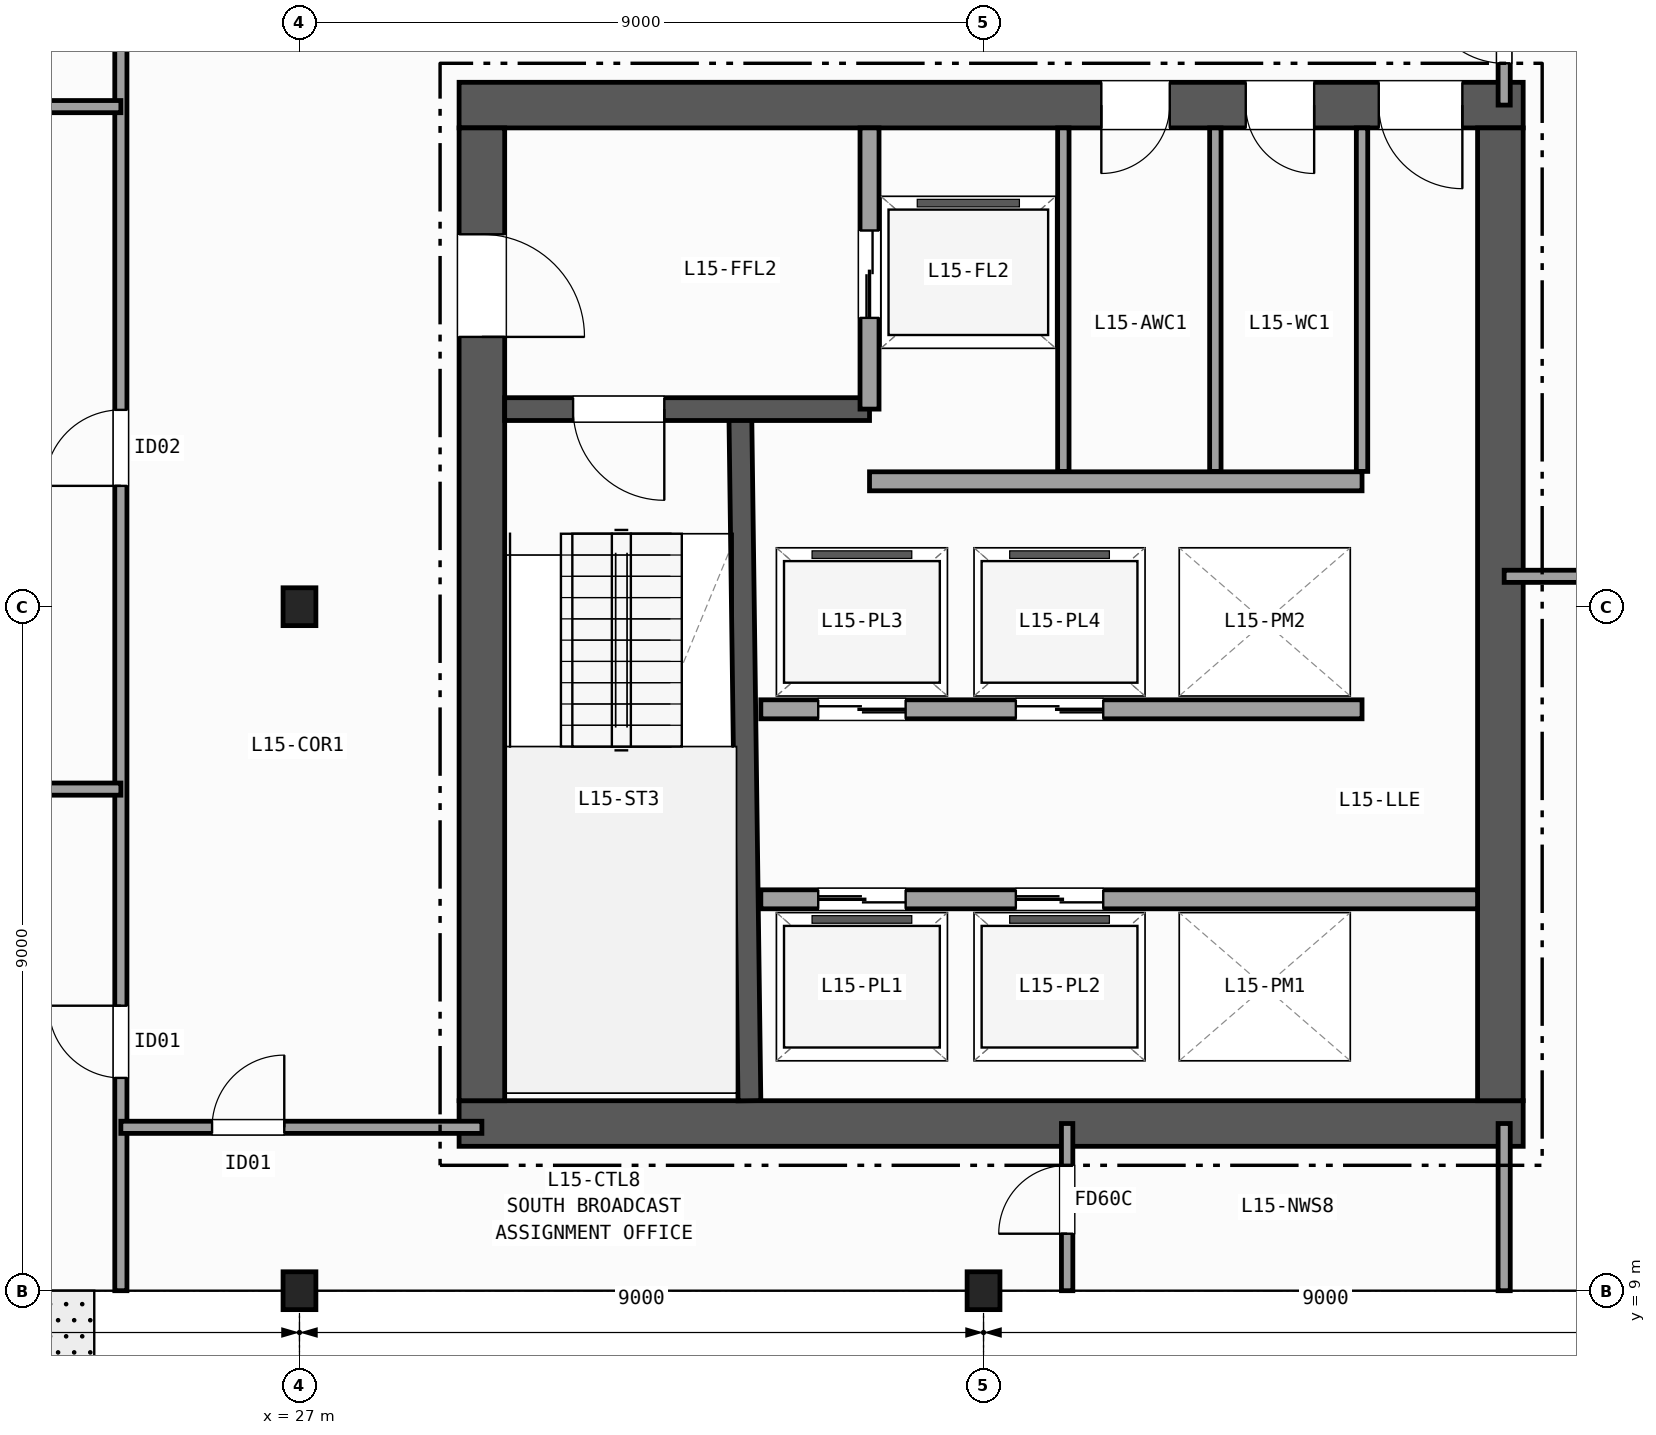
"""IFC4 building model, lengths in metres.
Left out: names, types, materials, properties, quantities, classifications, styles, units other than length and angle.
Written with IfcOpenShell. Run it as: python <this file> out.ifc"""

import sys

from ifc_helpers import new_model, si_unit, direction, frame, frame_2d, origin, origin_2d, place, context, subcontext, project, spatial, rectangle, i_section, extrude, element, fill, save


model = new_model("IFC4")
c1 = context("Model", 3, precision=1e-05, world=origin(), true_north=direction((0.0, 1.0)))
c2 = subcontext(c1, "Body", "Model", "MODEL_VIEW")
j1 = project(units=[si_unit("LENGTHUNIT", "METRE"), si_unit("PLANEANGLEUNIT", "RADIAN")], contexts=[c1])
p1 = place(None, origin())
s1 = spatial("IfcSite", under=j1, at=p1, CompositionType="ELEMENT")
p2 = place(p1, origin())
s2 = spatial("IfcBuilding", under=s1, at=p2, CompositionType="ELEMENT")
p3 = place(p2, frame((0.0, 0.0, 65.6)))
s3 = spatial("IfcBuildingStorey", under=s2, at=p3, CompositionType="ELEMENT", Elevation=65.6)
for number, where, z_axis, x_axis in (
    (1, (27.0, 9.0, 0.0), (0.0, 0.0, 1.0), (1.0, 0.0, 0.0)),
    (2, (27.0, 18.0, 0.0), (0.0, 0.0, 1.0), (1.0, 0.0, 0.0)),
    (3, (36.0, 9.0, 0.0), (0.0, 0.0, 1.0), (1.0, 0.0, 0.0)),
):
    element("IfcColumn", number, at=place(p3, frame(where, z_axis=z_axis, x_axis=x_axis)), inside=s3, PredefinedType="COLUMN", context=c2, shape_type="SweptSolid", body=[
        extrude(i_section(OverallWidth=0.432, OverallDepth=0.498, WebThickness=0.056, FlangeThickness=0.089, FilletRadius=0.015, at=origin_2d()), origin(), (0.0, 0.0, 1.0), 3.7),
    ])
p4 = place(p3, frame((29.1, 11.2, 0.0), z_axis=(0.0, 0.0, 1.0), x_axis=(1.0, 0.0, 0.0)))
e4 = element("IfcWall", 4, at=p4, inside=s3, PredefinedType="SHEAR", context=c2, shape_type="SweptSolid", body=[
    extrude(rectangle(XDim=14.0, YDim=0.6, at=frame_2d((7.0, 0.0))), origin(), (0.0, 0.0, 1.0), 3.42),
])
p5 = place(p3, frame((43.1, 24.6, 0.0), z_axis=(0.0, 0.0, 1.0), x_axis=(-1.0, 0.0, 0.0)))
e5 = element("IfcWall", 5, at=p5, inside=s3, PredefinedType="SHEAR", context=c2, shape_type="SweptSolid", body=[
    extrude(rectangle(XDim=14.0, YDim=0.6, at=frame_2d((7.0, 0.0))), origin(), (0.0, 0.0, 1.0), 3.42),
])
p6 = place(p5, frame((0.8, 0.0, 0.0)))
e6 = element("IfcOpeningElement", 6, at=p6, cuts=e5, PredefinedType="OPENING", context=c2, shape_type="SweptSolid", body=[
    extrude(rectangle(XDim=1.1, YDim=2.15, at=frame_2d((0.55, 1.075))), frame((0.0, 0.31, 0.0), z_axis=(0.0, -1.0, 0.0), x_axis=(1.0, 0.0, 0.0)), (0.0, 0.0, 1.0), 0.62),
])
p7 = place(p5, frame((2.75, 0.0, 0.0)))
e7 = element("IfcOpeningElement", 7, at=p7, cuts=e5, PredefinedType="OPENING", context=c2, shape_type="SweptSolid", body=[
    extrude(rectangle(XDim=0.9, YDim=2.1, at=frame_2d((0.45, 1.05))), frame((0.0, 0.31, 0.0), z_axis=(0.0, -1.0, 0.0), x_axis=(1.0, 0.0, 0.0)), (0.0, 0.0, 1.0), 0.62),
])
p8 = place(p5, frame((4.65, 0.0, 0.0)))
e8 = element("IfcOpeningElement", 8, at=p8, cuts=e5, PredefinedType="OPENING", context=c2, shape_type="SweptSolid", body=[
    extrude(rectangle(XDim=0.9, YDim=2.1, at=frame_2d((0.45, 1.05))), frame((0.0, 0.31, 0.0), z_axis=(0.0, -1.0, 0.0), x_axis=(1.0, 0.0, 0.0)), (0.0, 0.0, 1.0), 0.62),
])
p9 = place(p3, frame((29.4, 24.3, 0.0), z_axis=(0.0, 0.0, 1.0), x_axis=(0.0, -1.0, 0.0)))
e9 = element("IfcWall", 9, at=p9, inside=s3, PredefinedType="SHEAR", context=c2, shape_type="SweptSolid", body=[
    extrude(rectangle(XDim=12.8, YDim=0.6, at=frame_2d((6.4, 0.0))), origin(), (0.0, 0.0, 1.0), 3.42),
])
p10 = place(p9, frame((1.4, 0.0, 0.0)))
e10 = element("IfcOpeningElement", 10, at=p10, cuts=e9, PredefinedType="OPENING", context=c2, shape_type="SweptSolid", body=[
    extrude(rectangle(XDim=1.35, YDim=2.15, at=frame_2d((0.675, 1.075))), frame((0.0, 0.31, 0.0), z_axis=(0.0, -1.0, 0.0), x_axis=(1.0, 0.0, 0.0)), (0.0, 0.0, 1.0), 0.62),
])
p11 = place(p3, frame((42.8, 11.5, 0.0), z_axis=(0.0, 0.0, 1.0), x_axis=(0.0, 1.0, 0.0)))
e11 = element("IfcWall", 11, at=p11, inside=s3, PredefinedType="SHEAR", context=c2, shape_type="SweptSolid", body=[
    extrude(rectangle(XDim=12.8, YDim=0.6, at=frame_2d((6.4, 0.0))), origin(), (0.0, 0.0, 1.0), 3.42),
])
p12 = place(p3, frame((32.92, 11.5, 0.0), z_axis=(0.0, 0.0, 1.0), x_axis=(-0.013244407292, 0.999912288991, 0.0)))
e12 = element("IfcWall", 12, at=p12, inside=s3, PredefinedType="SHEAR", context=c2, shape_type="SweptSolid", body=[
    extrude(rectangle(XDim=9.051, YDim=0.3, at=frame_2d((4.525, 0.0))), origin(), (0.0, 0.0, 1.0), 3.42),
])
p13 = place(p3, frame((34.5, 20.6, 0.0), z_axis=(0.0, 0.0, 1.0), x_axis=(-1.0, 0.0, 0.0)))
e13 = element("IfcWall", 13, at=p13, inside=s3, PredefinedType="SHEAR", context=c2, shape_type="SweptSolid", body=[
    extrude(rectangle(XDim=4.8, YDim=0.3, at=frame_2d((2.4, 0.0))), origin(), (0.0, 0.0, 1.0), 3.42),
])
p14 = place(p13, frame((2.7, 0.0, 0.0)))
e14 = element("IfcOpeningElement", 14, at=p14, cuts=e13, PredefinedType="OPENING", context=c2, shape_type="SweptSolid", body=[
    extrude(rectangle(XDim=1.2, YDim=2.15, at=frame_2d((0.6, 1.075))), frame((0.0, 0.16, 0.0), z_axis=(0.0, -1.0, 0.0), x_axis=(1.0, 0.0, 0.0)), (0.0, 0.0, 1.0), 0.32),
])
p15 = place(p3, frame((34.5, 20.6, 0.0), z_axis=(0.0, 0.0, 1.0), x_axis=(0.0, 1.0, 0.0)))
e15 = element("IfcWall", 15, at=p15, inside=s3, PredefinedType="PARTITIONING", context=c2, shape_type="SweptSolid", body=[
    extrude(rectangle(XDim=3.7, YDim=0.25, at=frame_2d((1.85, 0.0))), origin(), (0.0, 0.0, 1.0), 3.42),
])
p16 = place(p15, frame((1.2, 0.0, 0.0)))
e16 = element("IfcOpeningElement", 16, at=p16, cuts=e15, PredefinedType="OPENING", context=c2, shape_type="SweptSolid", body=[
    extrude(rectangle(XDim=1.15, YDim=2.15, at=frame_2d((0.575, 1.075))), frame((0.0, 0.135, 0.0), z_axis=(0.0, -1.0, 0.0), x_axis=(1.0, 0.0, 0.0)), (0.0, 0.0, 1.0), 0.27),
])
p17 = place(p3, frame((34.5, 19.65, 0.0), z_axis=(0.0, 0.0, 1.0), x_axis=(1.0, 0.0, 0.0)))
e17 = element("IfcWall", 17, at=p17, inside=s3, PredefinedType="PARTITIONING", context=c2, shape_type="SweptSolid", body=[
    extrude(rectangle(XDim=6.48, YDim=0.25, at=frame_2d((3.24, 0.0))), origin(), (0.0, 0.0, 1.0), 3.42),
])
p18 = place(p3, frame((33.07, 14.15, 0.0), z_axis=(0.0, 0.0, 1.0), x_axis=(1.0, 0.0, 0.0)))
e18 = element("IfcWall", 18, at=p18, inside=s3, PredefinedType="PARTITIONING", context=c2, shape_type="SweptSolid", body=[
    extrude(rectangle(XDim=9.43, YDim=0.25, at=frame_2d((4.715, 0.0))), origin(), (0.0, 0.0, 1.0), 3.42),
])
p19 = place(p18, frame((0.755, 0.0, 0.0)))
e19 = element("IfcOpeningElement", 19, at=p19, cuts=e18, PredefinedType="OPENING", context=c2, shape_type="SweptSolid", body=[
    extrude(rectangle(XDim=1.15, YDim=2.15, at=frame_2d((0.575, 1.075))), frame((0.0, 0.135, 0.0), z_axis=(0.0, -1.0, 0.0), x_axis=(1.0, 0.0, 0.0)), (0.0, 0.0, 1.0), 0.27),
])
p20 = place(p18, frame((3.355, 0.0, 0.0)))
e20 = element("IfcOpeningElement", 20, at=p20, cuts=e18, PredefinedType="OPENING", context=c2, shape_type="SweptSolid", body=[
    extrude(rectangle(XDim=1.15, YDim=2.15, at=frame_2d((0.575, 1.075))), frame((0.0, 0.135, 0.0), z_axis=(0.0, -1.0, 0.0), x_axis=(1.0, 0.0, 0.0)), (0.0, 0.0, 1.0), 0.27),
])
p21 = place(p3, frame((40.98, 16.65, 0.0), z_axis=(0.0, 0.0, 1.0), x_axis=(-1.0, 0.0, 0.0)))
e21 = element("IfcWall", 21, at=p21, inside=s3, PredefinedType="PARTITIONING", context=c2, shape_type="SweptSolid", body=[
    extrude(rectangle(XDim=7.91, YDim=0.25, at=frame_2d((3.955, 0.0))), origin(), (0.0, 0.0, 1.0), 3.42),
])
p22 = place(p21, frame((6.005, 0.0, 0.0)))
e22 = element("IfcOpeningElement", 22, at=p22, cuts=e21, PredefinedType="OPENING", context=c2, shape_type="SweptSolid", body=[
    extrude(rectangle(XDim=1.15, YDim=2.15, at=frame_2d((0.575, 1.075))), frame((0.0, 0.135, 0.0), z_axis=(0.0, -1.0, 0.0), x_axis=(1.0, 0.0, 0.0)), (0.0, 0.0, 1.0), 0.27),
])
p23 = place(p21, frame((3.405, 0.0, 0.0)))
e23 = element("IfcOpeningElement", 23, at=p23, cuts=e21, PredefinedType="OPENING", context=c2, shape_type="SweptSolid", body=[
    extrude(rectangle(XDim=1.15, YDim=2.15, at=frame_2d((0.575, 1.075))), frame((0.0, 0.135, 0.0), z_axis=(0.0, -1.0, 0.0), x_axis=(1.0, 0.0, 0.0)), (0.0, 0.0, 1.0), 0.27),
])
for number, where, z_axis, x_axis in (
    (24, (37.05, 19.78, 0.0), (0.0, 0.0, 1.0), (0.0, 1.0, 0.0)),
    (25, (39.05, 19.78, 0.0), (0.0, 0.0, 1.0), (0.0, 1.0, 0.0)),
    (26, (40.98, 19.78, 0.0), (0.0, 0.0, 1.0), (0.0, 1.0, 0.0)),
):
    element("IfcWall", number, at=place(p3, frame(where, z_axis=z_axis, x_axis=x_axis)), inside=s3, PredefinedType="PARTITIONING", context=c2, shape_type="SweptSolid", body=[
        extrude(rectangle(XDim=4.52, YDim=0.15, at=frame_2d((2.26, 0.0))), origin(), (0.0, 0.0, 1.0), 3.42),
    ])
p24 = place(p3, frame((24.65, 9.0, 0.0), z_axis=(0.0, 0.0, 1.0), x_axis=(0.0, 1.0, 0.0)))
e27 = element("IfcWall", 27, at=p24, inside=s3, PredefinedType="PARTITIONING", context=c2, shape_type="SweptSolid", body=[
    extrude(rectangle(XDim=19.2, YDim=0.16, at=frame_2d((9.6, 0.0))), origin(), (0.0, 0.0, 1.0), 2.627),
])
p25 = place(p24, frame((2.8, 0.0, 0.0)))
e28 = element("IfcOpeningElement", 28, at=p25, cuts=e27, PredefinedType="OPENING", context=c2, shape_type="SweptSolid", body=[
    extrude(rectangle(XDim=0.95, YDim=2.1, at=frame_2d((0.475, 1.05))), frame((0.0, 0.09, 0.0), z_axis=(0.0, -1.0, 0.0), x_axis=(1.0, 0.0, 0.0)), (0.0, 0.0, 1.0), 0.18),
])
p26 = place(p24, frame((10.59, 0.0, 0.0)))
e29 = element("IfcOpeningElement", 29, at=p26, cuts=e27, PredefinedType="OPENING", context=c2, shape_type="SweptSolid", body=[
    extrude(rectangle(XDim=1.0, YDim=2.1, at=frame_2d((0.5, 1.05))), frame((0.0, 0.09, 0.0), z_axis=(0.0, -1.0, 0.0), x_axis=(1.0, 0.0, 0.0)), (0.0, 0.0, 1.0), 0.18),
])
p27 = place(p3, frame((9.0, 24.58, 0.0), z_axis=(0.0, 0.0, 1.0), x_axis=(1.0, 0.0, 0.0)))
e30 = element("IfcWall", 30, at=p27, inside=s3, PredefinedType="PARTITIONING", context=c2, shape_type="SweptSolid", body=[
    extrude(rectangle(XDim=15.65, YDim=0.16, at=frame_2d((7.825, 0.0))), origin(), (0.0, 0.0, 1.0), 2.627),
])
p28 = place(p3, frame((18.0, 15.6, 0.0), z_axis=(0.0, 0.0, 1.0), x_axis=(1.0, 0.0, 0.0)))
e31 = element("IfcWall", 31, at=p28, inside=s3, PredefinedType="PARTITIONING", context=c2, shape_type="SweptSolid", body=[
    extrude(rectangle(XDim=6.65, YDim=0.16, at=frame_2d((3.325, 0.0))), origin(), (0.0, 0.0, 1.0), 2.789),
])
p29 = place(p3, frame((24.65, 11.15, 0.0), z_axis=(0.0, 0.0, 1.0), x_axis=(1.0, 0.0, 0.0)))
e32 = element("IfcWall", 32, at=p29, inside=s3, PredefinedType="PARTITIONING", context=c2, shape_type="SweptSolid", body=[
    extrude(rectangle(XDim=4.75, YDim=0.16, at=frame_2d((2.375, 0.0))), origin(), (0.0, 0.0, 1.0), 2.792),
])
p30 = place(p29, frame((1.2, 0.0, 0.0)))
e33 = element("IfcOpeningElement", 33, at=p30, cuts=e32, PredefinedType="OPENING", context=c2, shape_type="SweptSolid", body=[
    extrude(rectangle(XDim=0.95, YDim=2.1, at=frame_2d((0.475, 1.05))), frame((0.0, 0.09, 0.0), z_axis=(0.0, -1.0, 0.0), x_axis=(1.0, 0.0, 0.0)), (0.0, 0.0, 1.0), 0.18),
])
p31 = place(p3, frame((37.1, 9.0, 0.0), z_axis=(0.0, 0.0, 1.0), x_axis=(0.0, 1.0, 0.0)))
e34 = element("IfcWall", 34, at=p31, inside=s3, PredefinedType="PARTITIONING", context=c2, shape_type="SweptSolid", body=[
    extrude(rectangle(XDim=2.2, YDim=0.15, at=frame_2d((1.1, 0.0))), origin(), (0.0, 0.0, 1.0), 2.627),
])
p32 = place(p31, frame((0.75, 0.0, 0.0)))
e35 = element("IfcOpeningElement", 35, at=p32, cuts=e34, PredefinedType="OPENING", context=c2, shape_type="SweptSolid", body=[
    extrude(rectangle(XDim=0.9, YDim=2.1, at=frame_2d((0.45, 1.05))), frame((0.0, 0.085, 0.0), z_axis=(0.0, -1.0, 0.0), x_axis=(1.0, 0.0, 0.0)), (0.0, 0.0, 1.0), 0.17),
])
p33 = place(p3, frame((42.85, 9.0, 0.0), z_axis=(0.0, 0.0, 1.0), x_axis=(0.0, 1.0, 0.0)))
e36 = element("IfcWall", 36, at=p33, inside=s3, PredefinedType="PARTITIONING", context=c2, shape_type="SweptSolid", body=[
    extrude(rectangle(XDim=2.2, YDim=0.16, at=frame_2d((1.1, 0.0))), origin(), (0.0, 0.0, 1.0), 2.627),
])
p34 = place(p3, frame((42.85, 24.6, 0.0), z_axis=(0.0, 0.0, 1.0), x_axis=(0.0, 1.0, 0.0)))
e37 = element("IfcWall", 37, at=p34, inside=s3, PredefinedType="PARTITIONING", context=c2, shape_type="SweptSolid", body=[
    extrude(rectangle(XDim=2.4, YDim=0.16, at=frame_2d((1.2, 0.0))), origin(), (0.0, 0.0, 1.0), 2.627),
])
p35 = place(p34, frame((0.55, 0.0, 0.0)))
e38 = element("IfcOpeningElement", 38, at=p35, cuts=e37, PredefinedType="OPENING", context=c2, shape_type="SweptSolid", body=[
    extrude(rectangle(XDim=1.05, YDim=2.15, at=frame_2d((0.525, 1.075))), frame((0.0, 0.09, 0.0), z_axis=(0.0, -1.0, 0.0), x_axis=(1.0, 0.0, 0.0)), (0.0, 0.0, 1.0), 0.18),
])
p36 = place(p3, frame((42.85, 18.4, 0.0), z_axis=(0.0, 0.0, 1.0), x_axis=(1.0, 0.0, 0.0)))
e39 = element("IfcWall", 39, at=p36, inside=s3, PredefinedType="PARTITIONING", context=c2, shape_type="SweptSolid", body=[
    extrude(rectangle(XDim=20.809, YDim=0.16, at=frame_2d((10.404, 0.0))), origin(), (0.0, 0.0, 1.0), 3.42),
])
p37 = place(p36, frame((2.95, 0.0, 0.0)))
e40 = element("IfcOpeningElement", 40, at=p37, cuts=e39, PredefinedType="OPENING", context=c2, shape_type="SweptSolid", body=[
    extrude(rectangle(XDim=1.2, YDim=2.15, at=frame_2d((0.6, 1.075))), frame((0.0, 0.09, 0.0), z_axis=(0.0, -1.0, 0.0), x_axis=(1.0, 0.0, 0.0)), (0.0, 0.0, 1.0), 0.18),
])
p38 = place(p14, origin())
e41 = element("IfcDoor", 41, at=p38, inside=s3, OperationType="SINGLE_SWING_LEFT", PredefinedType="DOOR", context=c2, shape_type="SweptSolid", body=[
    extrude(rectangle(XDim=1.2, YDim=2.15, at=frame_2d((0.6, 1.075))), frame((0.0, 0.025, 0.0), z_axis=(0.0, -1.0, 0.0), x_axis=(1.0, 0.0, 0.0)), (0.0, 0.0, 1.0), 0.05),
])
fill(e14, e41)
p39 = place(p10, origin())
e42 = element("IfcDoor", 42, at=p39, inside=s3, OperationType="SINGLE_SWING_RIGHT", PredefinedType="DOOR", context=c2, shape_type="SweptSolid", body=[
    extrude(rectangle(XDim=1.35, YDim=2.15, at=frame_2d((0.675, 1.075))), frame((0.0, 0.025, 0.0), z_axis=(0.0, -1.0, 0.0), x_axis=(1.0, 0.0, 0.0)), (0.0, 0.0, 1.0), 0.05),
])
fill(e10, e42)
p40 = place(p6, origin())
e43 = element("IfcDoor", 43, at=p40, inside=s3, OperationType="SINGLE_SWING_LEFT", PredefinedType="DOOR", context=c2, shape_type="SweptSolid", body=[
    extrude(rectangle(XDim=1.1, YDim=2.15, at=frame_2d((0.55, 1.075))), frame((0.0, 0.025, 0.0), z_axis=(0.0, -1.0, 0.0), x_axis=(1.0, 0.0, 0.0)), (0.0, 0.0, 1.0), 0.05),
])
fill(e6, e43)
p41 = place(p7, origin())
e44 = element("IfcDoor", 44, at=p41, inside=s3, OperationType="SINGLE_SWING_LEFT", PredefinedType="DOOR", context=c2, shape_type="SweptSolid", body=[
    extrude(rectangle(XDim=0.9, YDim=2.1, at=frame_2d((0.45, 1.05))), frame((0.0, 0.025, 0.0), z_axis=(0.0, -1.0, 0.0), x_axis=(1.0, 0.0, 0.0)), (0.0, 0.0, 1.0), 0.05),
])
fill(e7, e44)
p42 = place(p8, origin())
e45 = element("IfcDoor", 45, at=p42, inside=s3, OperationType="SINGLE_SWING_RIGHT", PredefinedType="DOOR", context=c2, shape_type="SweptSolid", body=[
    extrude(rectangle(XDim=0.9, YDim=2.1, at=frame_2d((0.45, 1.05))), frame((0.0, 0.025, 0.0), z_axis=(0.0, -1.0, 0.0), x_axis=(1.0, 0.0, 0.0)), (0.0, 0.0, 1.0), 0.05),
])
fill(e8, e45)
p43 = place(p16, origin())
e46 = element("IfcDoor", 46, at=p43, inside=s3, OperationType="DOUBLE_DOOR_SLIDING", PredefinedType="DOOR", context=c2, shape_type="SweptSolid", body=[
    extrude(rectangle(XDim=1.15, YDim=2.15, at=frame_2d((0.575, 1.075))), frame((0.0, 0.025, 0.0), z_axis=(0.0, -1.0, 0.0), x_axis=(1.0, 0.0, 0.0)), (0.0, 0.0, 1.0), 0.05),
])
fill(e16, e46)
p44 = place(p19, origin())
e47 = element("IfcDoor", 47, at=p44, inside=s3, OperationType="DOUBLE_DOOR_SLIDING", PredefinedType="DOOR", context=c2, shape_type="SweptSolid", body=[
    extrude(rectangle(XDim=1.15, YDim=2.15, at=frame_2d((0.575, 1.075))), frame((0.0, 0.025, 0.0), z_axis=(0.0, -1.0, 0.0), x_axis=(1.0, 0.0, 0.0)), (0.0, 0.0, 1.0), 0.05),
])
fill(e19, e47)
p45 = place(p20, origin())
e48 = element("IfcDoor", 48, at=p45, inside=s3, OperationType="DOUBLE_DOOR_SLIDING", PredefinedType="DOOR", context=c2, shape_type="SweptSolid", body=[
    extrude(rectangle(XDim=1.15, YDim=2.15, at=frame_2d((0.575, 1.075))), frame((0.0, 0.025, 0.0), z_axis=(0.0, -1.0, 0.0), x_axis=(1.0, 0.0, 0.0)), (0.0, 0.0, 1.0), 0.05),
])
fill(e20, e48)
p46 = place(p22, origin())
e49 = element("IfcDoor", 49, at=p46, inside=s3, OperationType="DOUBLE_DOOR_SLIDING", PredefinedType="DOOR", context=c2, shape_type="SweptSolid", body=[
    extrude(rectangle(XDim=1.15, YDim=2.15, at=frame_2d((0.575, 1.075))), frame((0.0, 0.025, 0.0), z_axis=(0.0, -1.0, 0.0), x_axis=(1.0, 0.0, 0.0)), (0.0, 0.0, 1.0), 0.05),
])
fill(e22, e49)
p47 = place(p23, origin())
e50 = element("IfcDoor", 50, at=p47, inside=s3, OperationType="DOUBLE_DOOR_SLIDING", PredefinedType="DOOR", context=c2, shape_type="SweptSolid", body=[
    extrude(rectangle(XDim=1.15, YDim=2.15, at=frame_2d((0.575, 1.075))), frame((0.0, 0.025, 0.0), z_axis=(0.0, -1.0, 0.0), x_axis=(1.0, 0.0, 0.0)), (0.0, 0.0, 1.0), 0.05),
])
fill(e23, e50)
p48 = place(p25, origin())
e51 = element("IfcDoor", 51, at=p48, inside=s3, OperationType="SINGLE_SWING_RIGHT", PredefinedType="DOOR", context=c2, shape_type="SweptSolid", body=[
    extrude(rectangle(XDim=0.95, YDim=2.1, at=frame_2d((0.475, 1.05))), frame((0.0, 0.025, 0.0), z_axis=(0.0, -1.0, 0.0), x_axis=(1.0, 0.0, 0.0)), (0.0, 0.0, 1.0), 0.05),
])
fill(e28, e51)
p49 = place(p26, origin())
e52 = element("IfcDoor", 52, at=p49, inside=s3, OperationType="SINGLE_SWING_LEFT", PredefinedType="DOOR", context=c2, shape_type="SweptSolid", body=[
    extrude(rectangle(XDim=1.0, YDim=2.1, at=frame_2d((0.5, 1.05))), frame((0.0, 0.025, 0.0), z_axis=(0.0, -1.0, 0.0), x_axis=(1.0, 0.0, 0.0)), (0.0, 0.0, 1.0), 0.05),
])
fill(e29, e52)
p50 = place(p30, origin())
e53 = element("IfcDoor", 53, at=p50, inside=s3, OperationType="SINGLE_SWING_RIGHT", PredefinedType="DOOR", context=c2, shape_type="SweptSolid", body=[
    extrude(rectangle(XDim=0.95, YDim=2.1, at=frame_2d((0.475, 1.05))), frame((0.0, 0.025, 0.0), z_axis=(0.0, -1.0, 0.0), x_axis=(1.0, 0.0, 0.0)), (0.0, 0.0, 1.0), 0.05),
])
fill(e33, e53)
p51 = place(p32, origin())
e54 = element("IfcDoor", 54, at=p51, inside=s3, OperationType="SINGLE_SWING_LEFT", PredefinedType="DOOR", context=c2, shape_type="SweptSolid", body=[
    extrude(rectangle(XDim=0.9, YDim=2.1, at=frame_2d((0.45, 1.05))), frame((0.0, 0.025, 0.0), z_axis=(0.0, -1.0, 0.0), x_axis=(1.0, 0.0, 0.0)), (0.0, 0.0, 1.0), 0.05),
])
fill(e35, e54)
p52 = place(p35, origin())
e55 = element("IfcDoor", 55, at=p52, inside=s3, OperationType="SINGLE_SWING_RIGHT", PredefinedType="DOOR", context=c2, shape_type="SweptSolid", body=[
    extrude(rectangle(XDim=1.05, YDim=2.15, at=frame_2d((0.525, 1.075))), frame((0.0, 0.025, 0.0), z_axis=(0.0, -1.0, 0.0), x_axis=(1.0, 0.0, 0.0)), (0.0, 0.0, 1.0), 0.05),
])
fill(e38, e55)
save(model, sys.argv[1])
